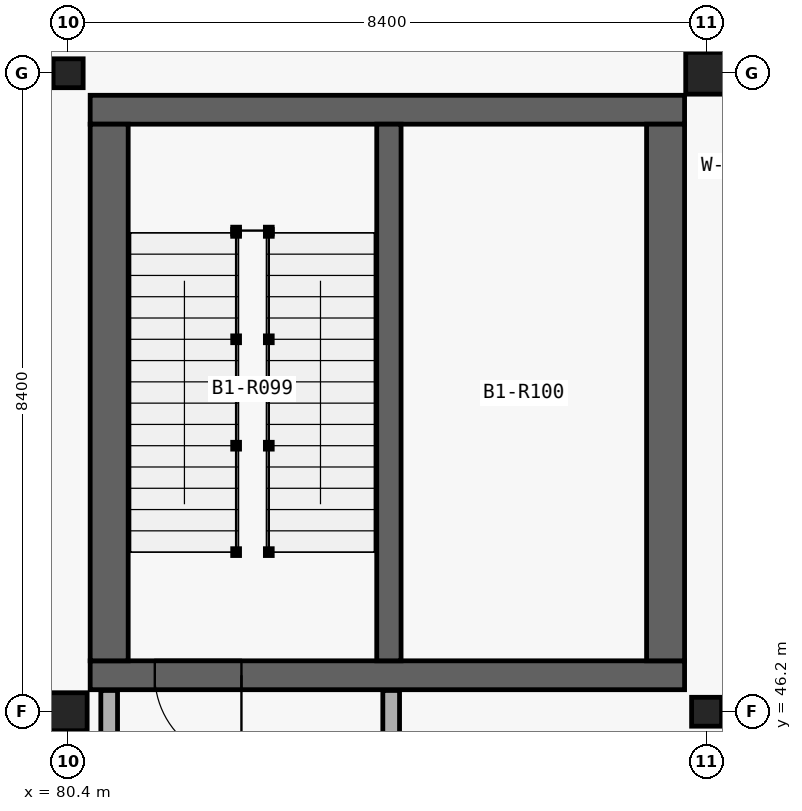
"""IFC4 building model, lengths in metres.
Left out: names, types, materials, properties, quantities, classifications, styles, units other than length and angle.
Written with IfcOpenShell. Run it as: python <this file> out.ifc"""

import sys

from ifc_helpers import new_model, si_unit, direction, frame, frame_2d, origin_with_axes, origin_2d_with_axis, place, context, subcontext, project, spatial, rectangle, i_section, extrude, element, fill, save


model = new_model("IFC4")
c1 = context("Model", 3, precision=1e-05, world=origin_with_axes(), true_north=direction((0.0, 1.0)))
c2 = subcontext(c1, "Body", "Model", "MODEL_VIEW")
j1 = project(units=[si_unit("LENGTHUNIT", "METRE"), si_unit("PLANEANGLEUNIT", "RADIAN")], contexts=[c1])
p1 = place(None, origin_with_axes())
s1 = spatial("IfcSite", under=j1, at=p1, CompositionType="ELEMENT")
p2 = place(p1, origin_with_axes())
s2 = spatial("IfcBuilding", under=s1, at=p2, CompositionType="ELEMENT")
p3 = place(p2, frame((0.0, 0.0, -4.8), z_axis=(0.0, 0.0, 1.0), x_axis=(1.0, 0.0, 0.0)))
s3 = spatial("IfcBuildingStorey", under=s2, at=p3, CompositionType="ELEMENT", Elevation=-4.8)
p4 = place(None, frame((80.69, 46.68, -5.35), z_axis=(0.0, 0.0, 1.0), x_axis=(1.0, 0.0, 0.0)))
e1 = element("IfcWall", 1, at=p4, inside=s3, PredefinedType="SHEAR", context=c2, shape_type="SweptSolid", body=[
    extrude(rectangle(XDim=7.82, YDim=0.38, at=frame_2d((3.91, 0.0), x_axis=(1.0, 0.0))), origin_with_axes(), (0.0, 0.0, 1.0), 5.35),
])
p5 = place(None, frame((82.11, 46.68, -4.8), z_axis=(0.0, 0.0, 1.0), x_axis=(1.0, 0.0, 0.0)))
e2 = element("IfcOpeningElement", 2, at=p5, cuts=e1, PredefinedType="OPENING", context=c2, shape_type="SweptSolid", body=[
    extrude(rectangle(XDim=1.14, YDim=2.18, at=frame_2d((0.0, 1.09), x_axis=(1.0, 0.0))), frame((0.0, 0.2, 0.0), z_axis=(0.0, -1.0, 0.0), x_axis=(1.0, 0.0, 0.0)), (0.0, 0.0, 1.0), 0.4),
])
p6 = place(None, frame((88.51, 54.12, -5.35), z_axis=(0.0, 0.0, 1.0), x_axis=(-1.0, 0.0, 0.0)))
e3 = element("IfcWall", 3, at=p6, inside=s3, PredefinedType="SHEAR", context=c2, shape_type="SweptSolid", body=[
    extrude(rectangle(XDim=7.82, YDim=0.38, at=frame_2d((3.91, 0.0), x_axis=(1.0, 0.0))), origin_with_axes(), (0.0, 0.0, 1.0), 5.35),
])
for number, where, z_axis, x_axis in (
    (4, (88.26, 46.87, -5.35), (0.0, 0.0, 1.0), (0.0, 1.0, 0.0)),
    (5, (80.94, 53.93, -5.35), (0.0, 0.0, 1.0), (0.0, -1.0, 0.0)),
):
    element("IfcWall", number, at=place(None, frame(where, z_axis=z_axis, x_axis=x_axis)), inside=s3, PredefinedType="SHEAR", context=c2, shape_type="SweptSolid", body=[
        extrude(rectangle(XDim=7.06, YDim=0.5, at=frame_2d((3.53, 0.0), x_axis=(1.0, 0.0))), origin_with_axes(), (0.0, 0.0, 1.0), 5.35),
    ])
p7 = place(None, frame((84.62, 46.87, -5.35), z_axis=(0.0, 0.0, 1.0), x_axis=(0.0, 1.0, 0.0)))
e6 = element("IfcWall", 6, at=p7, inside=s3, PredefinedType="SHEAR", context=c2, shape_type="SweptSolid", body=[
    extrude(rectangle(XDim=7.06, YDim=0.32, at=frame_2d((3.53, 0.0), x_axis=(1.0, 0.0))), origin_with_axes(), (0.0, 0.0, 1.0), 5.35),
])
for number, where, z_axis, x_axis in (
    (7, (80.94, 45.22, -4.8), (0.0, 0.0, 1.0), (0.0, 1.0, 0.0)),
    (8, (84.65, 45.22, -4.8), (0.0, 0.0, 1.0), (0.0, 1.0, 0.0)),
):
    element("IfcWall", number, at=place(None, frame(where, z_axis=z_axis, x_axis=x_axis)), inside=s3, PredefinedType="PARTITIONING", context=c2, shape_type="SweptSolid", body=[
        extrude(rectangle(XDim=1.26, YDim=0.22, at=frame_2d((0.63, 0.0), x_axis=(1.0, 0.0))), origin_with_axes(), (0.0, 0.0, 1.0), 4.44),
    ])
p8 = place(None, frame((80.4, 46.2, -5.35), z_axis=(0.0, 0.0, 1.0), x_axis=(1.0, 0.0, 0.0)))
e9 = element("IfcColumn", 9, at=p8, inside=s3, PredefinedType="COLUMN", context=c2, shape_type="SweptSolid", body=[
    extrude(i_section(OverallWidth=0.5, OverallDepth=0.5, WebThickness=0.022, FlangeThickness=0.036, at=origin_2d_with_axis()), origin_with_axes(), (0.0, 0.0, 1.0), 5.35),
])
for number, where, z_axis, x_axis in (
    (10, (80.4, 54.6, -5.35), (0.0, 0.0, 1.0), (1.0, 0.0, 0.0)),
    (11, (88.8, 46.2, -5.35), (0.0, 0.0, 1.0), (1.0, 0.0, 0.0)),
):
    element("IfcColumn", number, at=place(None, frame(where, z_axis=z_axis, x_axis=x_axis)), inside=s3, PredefinedType="COLUMN", context=c2, shape_type="SweptSolid", body=[
        extrude(i_section(OverallWidth=0.395, OverallDepth=0.38, WebThickness=0.019, FlangeThickness=0.03, at=origin_2d_with_axis()), origin_with_axes(), (0.0, 0.0, 1.0), 5.35),
    ])
p9 = place(None, frame((88.8, 54.6, -5.35), z_axis=(0.0, 0.0, 1.0), x_axis=(1.0, 0.0, 0.0)))
e12 = element("IfcColumn", 12, at=p9, inside=s3, PredefinedType="COLUMN", context=c2, shape_type="SweptSolid", body=[
    extrude(i_section(OverallWidth=0.55, OverallDepth=0.55, WebThickness=0.025, FlangeThickness=0.042, at=origin_2d_with_axis()), origin_with_axes(), (0.0, 0.0, 1.0), 5.35),
])
p10 = place(None, frame((82.11, 46.68, -4.8), z_axis=(0.0, 0.0, 1.0), x_axis=(-1.0, 0.0, 0.0)))
e13 = element("IfcDoor", 13, at=p10, inside=s3, OperationType="SINGLE_SWING_RIGHT", PredefinedType="DOOR", context=c2, shape_type="SweptSolid", body=[
    extrude(rectangle(XDim=1.14, YDim=2.18, at=frame_2d((0.0, 1.09), x_axis=(1.0, 0.0))), frame((0.0, 0.04, 0.0), z_axis=(0.0, -1.0, 0.0), x_axis=(1.0, 0.0, 0.0)), (0.0, 0.0, 1.0), 0.08),
])
fill(e2, e13)
save(model, sys.argv[1])
